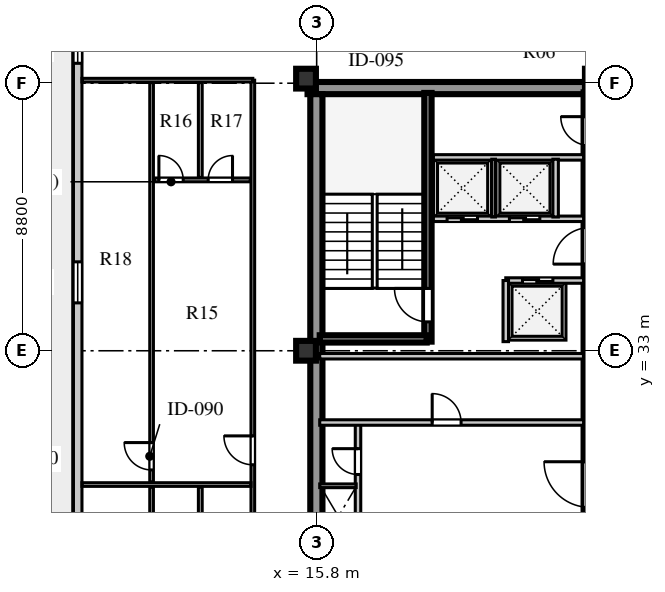
"""IFC4 building model, lengths in metres.
Left out: names, types, materials, properties, quantities, classifications, styles, units other than length and angle.
Written with IfcOpenShell. Run it as: python <this file> out.ifc"""

import sys

from ifc_helpers import new_model, si_unit, direction, frame, frame_2d, origin, origin_2d, place, context, subcontext, project, spatial, rectangle, extrude, element, fill, save


model = new_model("IFC4")
c1 = context("Model", 3, precision=1e-05, world=origin(), true_north=direction((0.0, 1.0)))
c2 = subcontext(c1, "Body", "Model", "MODEL_VIEW")
j1 = project(units=[si_unit("LENGTHUNIT", "METRE"), si_unit("PLANEANGLEUNIT", "RADIAN")], contexts=[c1])
p1 = place(None, origin())
s1 = spatial("IfcSite", under=j1, at=p1, CompositionType="ELEMENT")
p2 = place(p1, origin())
s2 = spatial("IfcBuilding", under=s1, at=p2, CompositionType="ELEMENT")
p3 = place(p2, frame((0.0, 0.0, 221.9)))
s3 = spatial("IfcBuildingStorey", under=s2, at=p3, CompositionType="ELEMENT", Elevation=221.9)
p4 = place(p3, frame((15.5, 41.64, 0.0), z_axis=(0.0, 0.0, 1.0), x_axis=(1.0, 0.0, 0.0)))
e1 = element("IfcWall", 1, at=p4, inside=s3, PredefinedType="SHEAR", context=c2, shape_type="SweptSolid", body=[
    extrude(rectangle(XDim=9.48, YDim=0.4, at=frame_2d((4.74, 0.0))), origin(), (0.0, 0.0, 1.0), 3.66),
])
p5 = place(p3, frame((15.79, 15.81, 0.0), z_axis=(0.0, 0.0, 1.0), x_axis=(0.0, 1.0, 0.0)))
e2 = element("IfcWall", 2, at=p5, inside=s3, PredefinedType="SHEAR", context=c2, shape_type="SweptSolid", body=[
    extrude(rectangle(XDim=25.63, YDim=0.4, at=frame_2d((12.815, 0.0))), origin(), (0.0, 0.0, 1.0), 3.66),
])
p6 = place(p3, frame((24.78, 15.74, 0.0), z_axis=(0.0, 0.0, 1.0), x_axis=(0.0, 1.0, 0.0)))
e3 = element("IfcWall", 3, at=p6, inside=s3, PredefinedType="SHEAR", context=c2, shape_type="SweptSolid", body=[
    extrude(rectangle(XDim=25.76, YDim=0.4, at=frame_2d((12.88, 0.0))), origin(), (0.0, 0.0, 1.0), 3.66),
])
p7 = place(p6, frame((1.61, 0.0, 0.0)))
e4 = element("IfcOpeningElement", 4, at=p7, cuts=e3, PredefinedType="OPENING", context=c2, shape_type="SweptSolid", body=[
    extrude(rectangle(XDim=1.2, YDim=2.1, at=frame_2d((0.6, 1.05))), frame((0.0, 0.21, 0.0), z_axis=(0.0, -1.0, 0.0), x_axis=(1.0, 0.0, 0.0)), (0.0, 0.0, 1.0), 0.42),
])
p8 = place(p6, frame((6.78, 0.0, 0.0)))
e5 = element("IfcOpeningElement", 5, at=p8, cuts=e3, PredefinedType="OPENING", context=c2, shape_type="SweptSolid", body=[
    extrude(rectangle(XDim=0.85, YDim=2.06, at=frame_2d((0.425, 1.03))), frame((0.0, 0.21, 0.0), z_axis=(0.0, -1.0, 0.0), x_axis=(1.0, 0.0, 0.0)), (0.0, 0.0, 1.0), 0.42),
])
p9 = place(p6, frame((12.11, 0.0, 0.0)))
e6 = element("IfcOpeningElement", 6, at=p9, cuts=e3, PredefinedType="OPENING", context=c2, shape_type="SweptSolid", body=[
    extrude(rectangle(XDim=1.5, YDim=2.12, at=frame_2d((0.75, 1.06))), frame((0.0, 0.21, 0.0), z_axis=(0.0, -1.0, 0.0), x_axis=(1.0, 0.0, 0.0)), (0.0, 0.0, 1.0), 0.42),
])
p10 = place(p6, frame((20.11, 0.0, 0.0)))
e7 = element("IfcOpeningElement", 7, at=p10, cuts=e3, PredefinedType="OPENING", context=c2, shape_type="SweptSolid", body=[
    extrude(rectangle(XDim=1.2, YDim=2.12, at=frame_2d((0.6, 1.06))), frame((0.0, 0.21, 0.0), z_axis=(0.0, -1.0, 0.0), x_axis=(1.0, 0.0, 0.0)), (0.0, 0.0, 1.0), 0.42),
])
p11 = place(p6, frame((24.01, 0.0, 0.0)))
e8 = element("IfcOpeningElement", 8, at=p11, cuts=e3, PredefinedType="OPENING", context=c2, shape_type="SweptSolid", body=[
    extrude(rectangle(XDim=0.95, YDim=2.1, at=frame_2d((0.475, 1.05))), frame((0.0, 0.21, 0.0), z_axis=(0.0, -1.0, 0.0), x_axis=(1.0, 0.0, 0.0)), (0.0, 0.0, 1.0), 0.42),
])
for number, where, z_axis, x_axis in (
    (9, (15.45, 33.0, 0.0), (0.0, 0.0, 1.0), (1.0, 0.0, 0.0)),
    (10, (15.45, 41.95, 0.0), (0.0, 0.0, 1.0), (1.0, 0.0, 0.0)),
):
    element("IfcColumn", number, at=place(p3, frame(where, z_axis=z_axis, x_axis=x_axis)), inside=s3, PredefinedType="COLUMN", context=c2, shape_type="SweptSolid", body=[
        extrude(rectangle(XDim=0.65, YDim=0.65, at=origin_2d()), origin(), (0.0, 0.0, 1.0), 3.66),
    ])
p12 = place(p3, frame((7.94, 44.07, 0.0), z_axis=(0.0, 0.0, 1.0), x_axis=(0.0, -1.0, 0.0)))
e11 = element("IfcWall", 11, at=p12, inside=s3, PredefinedType="STANDARD", context=c2, shape_type="SweptSolid", body=[
    extrude(rectangle(XDim=30.94, YDim=0.28, at=frame_2d((15.47, 0.0))), origin(), (0.0, 0.0, 1.0), 3.66),
])
p13 = place(p12, frame((29.325, 0.0, 0.8)))
e12 = element("IfcOpeningElement", 12, at=p13, cuts=e11, PredefinedType="OPENING", context=c2, shape_type="SweptSolid", body=[
    extrude(rectangle(XDim=0.95, YDim=1.65, at=frame_2d((0.475, 0.825))), frame((0.0, 0.15, 0.0), z_axis=(0.0, -1.0, 0.0), x_axis=(1.0, 0.0, 0.0)), (0.0, 0.0, 1.0), 0.3),
])
p14 = place(p12, frame((27.28, 0.0, 0.0)))
e13 = element("IfcOpeningElement", 13, at=p14, cuts=e11, PredefinedType="OPENING", context=c2, shape_type="SweptSolid", body=[
    extrude(rectangle(XDim=1.0, YDim=2.05, at=frame_2d((0.5, 1.025))), frame((0.0, 0.15, 0.0), z_axis=(0.0, -1.0, 0.0), x_axis=(1.0, 0.0, 0.0)), (0.0, 0.0, 1.0), 0.3),
])
p15 = place(p12, frame((23.47, 0.0, 0.8)))
e14 = element("IfcOpeningElement", 14, at=p15, cuts=e11, PredefinedType="OPENING", context=c2, shape_type="SweptSolid", body=[
    extrude(rectangle(XDim=2.4, YDim=2.05, at=frame_2d((1.2, 1.025))), frame((0.0, 0.15, 0.0), z_axis=(0.0, -1.0, 0.0), x_axis=(1.0, 0.0, 0.0)), (0.0, 0.0, 1.0), 0.3),
])
p16 = place(p12, frame((17.745, 0.0, 0.8)))
e15 = element("IfcOpeningElement", 15, at=p16, cuts=e11, PredefinedType="OPENING", context=c2, shape_type="SweptSolid", body=[
    extrude(rectangle(XDim=2.1, YDim=1.95, at=frame_2d((1.05, 0.975))), frame((0.0, 0.15, 0.0), z_axis=(0.0, -1.0, 0.0), x_axis=(1.0, 0.0, 0.0)), (0.0, 0.0, 1.0), 0.3),
])
p17 = place(p12, frame((8.145, 0.0, 0.8)))
e16 = element("IfcOpeningElement", 16, at=p17, cuts=e11, PredefinedType="OPENING", context=c2, shape_type="SweptSolid", body=[
    extrude(rectangle(XDim=1.35, YDim=1.9, at=frame_2d((0.675, 0.95))), frame((0.0, 0.15, 0.0), z_axis=(0.0, -1.0, 0.0), x_axis=(1.0, 0.0, 0.0)), (0.0, 0.0, 1.0), 0.3),
])
p18 = place(p12, frame((0.665, 0.0, 0.8)))
e17 = element("IfcOpeningElement", 17, at=p18, cuts=e11, PredefinedType="OPENING", context=c2, shape_type="SweptSolid", body=[
    extrude(rectangle(XDim=0.95, YDim=1.65, at=frame_2d((0.475, 0.825))), frame((0.0, 0.15, 0.0), z_axis=(0.0, -1.0, 0.0), x_axis=(1.0, 0.0, 0.0)), (0.0, 0.0, 1.0), 0.3),
])
p19 = place(p3, frame((17.16, 26.58, 0.0), z_axis=(0.0, 0.0, 1.0), x_axis=(0.0, 1.0, 0.0)))
e18 = element("IfcWall", 18, at=p19, inside=s3, PredefinedType="SOLIDWALL", context=c2, shape_type="SweptSolid", body=[
    extrude(rectangle(XDim=4.02, YDim=0.18, at=frame_2d((2.01, 0.0))), origin(), (0.0, 0.0, 1.0), 3.66),
])
p20 = place(p19, frame((2.35, 0.0, 0.0)))
e19 = element("IfcOpeningElement", 19, at=p20, cuts=e18, PredefinedType="OPENING", context=c2, shape_type="SweptSolid", body=[
    extrude(rectangle(XDim=0.85, YDim=2.06, at=frame_2d((0.425, 1.03))), frame((0.0, 0.1, 0.0), z_axis=(0.0, -1.0, 0.0), x_axis=(1.0, 0.0, 0.0)), (0.0, 0.0, 1.0), 0.2),
])
p21 = place(p3, frame((15.9, 28.56, 0.0), z_axis=(0.0, 0.0, 1.0), x_axis=(1.0, 0.0, 0.0)))
e20 = element("IfcWall", 20, at=p21, inside=s3, PredefinedType="PARTITIONING", context=c2, shape_type="SweptSolid", body=[
    extrude(rectangle(XDim=1.2, YDim=0.12, at=frame_2d((0.6, 0.0))), origin(), (0.0, 0.0, 1.0), 3.66),
])
p22 = place(p3, frame((15.9, 30.64, 0.0), z_axis=(0.0, 0.0, 1.0), x_axis=(1.0, 0.0, 0.0)))
e21 = element("IfcWall", 21, at=p22, inside=s3, PredefinedType="SOLIDWALL", context=c2, shape_type="SweptSolid", body=[
    extrude(rectangle(XDim=8.68, YDim=0.18, at=frame_2d((4.34, 0.0))), origin(), (0.0, 0.0, 1.0), 3.66),
])
p23 = place(p22, frame((3.7, 0.0, 0.0)))
e22 = element("IfcOpeningElement", 22, at=p23, cuts=e21, PredefinedType="OPENING", context=c2, shape_type="SweptSolid", body=[
    extrude(rectangle(XDim=0.95, YDim=2.1, at=frame_2d((0.475, 1.05))), frame((0.0, 0.1, 0.0), z_axis=(0.0, -1.0, 0.0), x_axis=(1.0, 0.0, 0.0)), (0.0, 0.0, 1.0), 0.2),
])
p24 = place(p3, frame((15.9, 32.82, 0.0), z_axis=(0.0, 0.0, 1.0), x_axis=(1.0, 0.0, 0.0)))
e23 = element("IfcWall", 23, at=p24, inside=s3, PredefinedType="SOLIDWALL", context=c2, shape_type="SweptSolid", body=[
    extrude(rectangle(XDim=8.68, YDim=0.18, at=frame_2d((4.34, 0.0))), origin(), (0.0, 0.0, 1.0), 3.06),
])
p25 = place(p3, frame((19.46, 33.3, 0.0), z_axis=(0.0, 0.0, 1.0), x_axis=(0.0, 1.0, 0.0)))
e24 = element("IfcWall", 24, at=p25, inside=s3, PredefinedType="SHEAR", context=c2, shape_type="SweptSolid", body=[
    extrude(rectangle(XDim=8.18, YDim=0.24, at=frame_2d((4.09, 0.0))), origin(), (0.0, 0.0, 1.0), 3.9),
])
p26 = place(p25, frame((0.65, 0.0, 0.0)))
e25 = element("IfcOpeningElement", 25, at=p26, cuts=e24, PredefinedType="OPENING", context=c2, shape_type="SweptSolid", body=[
    extrude(rectangle(XDim=1.1, YDim=2.1, at=frame_2d((0.55, 1.05))), frame((0.0, 0.13, 0.0), z_axis=(0.0, -1.0, 0.0), x_axis=(1.0, 0.0, 0.0)), (0.0, 0.0, 1.0), 0.26),
])
p27 = place(p3, frame((15.9, 33.39, 0.0), z_axis=(0.0, 0.0, 1.0), x_axis=(1.0, 0.0, 0.0)))
e26 = element("IfcWall", 26, at=p27, inside=s3, PredefinedType="SHEAR", context=c2, shape_type="SweptSolid", body=[
    extrude(rectangle(XDim=3.52, YDim=0.24, at=frame_2d((1.76, 0.0))), origin(), (0.0, 0.0, 1.0), 3.9),
])
p28 = place(p3, frame((22.02, 35.31, 0.0), z_axis=(0.0, 0.0, 1.0), x_axis=(1.0, 0.0, 0.0)))
e27 = element("IfcWall", 27, at=p28, inside=s3, PredefinedType="SOLIDWALL", context=c2, shape_type="SweptSolid", body=[
    extrude(rectangle(XDim=2.56, YDim=0.18, at=frame_2d((1.28, 0.0))), origin(), (0.0, 0.0, 1.0), 3.66),
])
p29 = place(p28, frame((0.55, 0.0, 0.0)))
e28 = element("IfcOpeningElement", 28, at=p29, cuts=e27, PredefinedType="OPENING", context=c2, shape_type="SweptSolid", body=[
    extrude(rectangle(XDim=1.0, YDim=2.1, at=frame_2d((0.5, 1.05))), frame((0.0, 0.1, 0.0), z_axis=(0.0, -1.0, 0.0), x_axis=(1.0, 0.0, 0.0)), (0.0, 0.0, 1.0), 0.2),
])
p30 = place(p3, frame((22.02, 33.3, 0.0), z_axis=(0.0, 0.0, 1.0), x_axis=(0.0, 1.0, 0.0)))
e29 = element("IfcWall", 29, at=p30, inside=s3, PredefinedType="SOLIDWALL", context=c2, shape_type="SweptSolid", body=[
    extrude(rectangle(XDim=2.01, YDim=0.18, at=frame_2d((1.005, 0.0))), origin(), (0.0, 0.0, 1.0), 3.66),
])
p31 = place(p3, frame((19.64, 37.34, 0.0), z_axis=(0.0, 0.0, 1.0), x_axis=(1.0, 0.0, 0.0)))
e30 = element("IfcWall", 30, at=p31, inside=s3, PredefinedType="SOLIDWALL", context=c2, shape_type="SweptSolid", body=[
    extrude(rectangle(XDim=4.94, YDim=0.18, at=frame_2d((2.47, 0.0))), origin(), (0.0, 0.0, 1.0), 3.66),
])
p32 = place(p31, frame((0.45, 0.0, 0.0)))
e31 = element("IfcOpeningElement", 31, at=p32, cuts=e30, PredefinedType="OPENING", context=c2, shape_type="SweptSolid", body=[
    extrude(rectangle(XDim=1.0, YDim=2.1, at=frame_2d((0.5, 1.05))), frame((0.0, 0.1, 0.0), z_axis=(0.0, -1.0, 0.0), x_axis=(1.0, 0.0, 0.0)), (0.0, 0.0, 1.0), 0.2),
])
p33 = place(p31, frame((2.5, 0.0, 0.0)))
e32 = element("IfcOpeningElement", 32, at=p33, cuts=e30, PredefinedType="OPENING", context=c2, shape_type="SweptSolid", body=[
    extrude(rectangle(XDim=1.0, YDim=2.1, at=frame_2d((0.5, 1.05))), frame((0.0, 0.1, 0.0), z_axis=(0.0, -1.0, 0.0), x_axis=(1.0, 0.0, 0.0)), (0.0, 0.0, 1.0), 0.2),
])
p34 = place(p3, frame((19.64, 39.36, 0.0), z_axis=(0.0, 0.0, 1.0), x_axis=(1.0, 0.0, 0.0)))
e33 = element("IfcWall", 33, at=p34, inside=s3, PredefinedType="SOLIDWALL", context=c2, shape_type="SweptSolid", body=[
    extrude(rectangle(XDim=4.94, YDim=0.18, at=frame_2d((2.47, 0.0))), origin(), (0.0, 0.0, 1.0), 3.66),
])
p35 = place(p3, frame((21.62, 37.4, 0.0), z_axis=(0.0, 0.0, 1.0), x_axis=(0.0, 1.0, 0.0)))
e34 = element("IfcWall", 34, at=p35, inside=s3, PredefinedType="PARTITIONING", context=c2, shape_type="SweptSolid", body=[
    extrude(rectangle(XDim=1.9, YDim=0.12, at=frame_2d((0.95, 0.0))), origin(), (0.0, 0.0, 1.0), 3.66),
])
p36 = place(p3, frame((23.66, 37.4, 0.0), z_axis=(0.0, 0.0, 1.0), x_axis=(0.0, 1.0, 0.0)))
e35 = element("IfcWall", 35, at=p36, inside=s3, PredefinedType="SOLIDWALL", context=c2, shape_type="SweptSolid", body=[
    extrude(rectangle(XDim=1.9, YDim=0.18, at=frame_2d((0.95, 0.0))), origin(), (0.0, 0.0, 1.0), 3.66),
])
p37 = place(p3, frame((13.7, 15.3, 0.0), z_axis=(0.0, 0.0, 1.0), x_axis=(0.0, 1.0, 0.0)))
e36 = element("IfcWall", 36, at=p37, inside=s3, PredefinedType="PARTITIONING", context=c2, shape_type="SweptSolid", body=[
    extrude(rectangle(XDim=26.6, YDim=0.12, at=frame_2d((13.3, 0.0))), origin(), (0.0, 0.0, 1.0), 3.66),
])
p38 = place(p37, frame((0.65, 0.0, 0.0)))
e37 = element("IfcOpeningElement", 37, at=p38, cuts=e36, PredefinedType="OPENING", context=c2, shape_type="SweptSolid", body=[
    extrude(rectangle(XDim=0.95, YDim=2.1, at=frame_2d((0.475, 1.05))), frame((0.0, 0.07, 0.0), z_axis=(0.0, -1.0, 0.0), x_axis=(1.0, 0.0, 0.0)), (0.0, 0.0, 1.0), 0.14),
])
p39 = place(p37, frame((13.95, 0.0, 0.0)))
e38 = element("IfcOpeningElement", 38, at=p39, cuts=e36, PredefinedType="OPENING", context=c2, shape_type="SweptSolid", body=[
    extrude(rectangle(XDim=0.95, YDim=2.1, at=frame_2d((0.475, 1.05))), frame((0.0, 0.07, 0.0), z_axis=(0.0, -1.0, 0.0), x_axis=(1.0, 0.0, 0.0)), (0.0, 0.0, 1.0), 0.14),
])
p40 = place(p3, frame((8.08, 41.9, 0.0), z_axis=(0.0, 0.0, 1.0), x_axis=(1.0, 0.0, 0.0)))
e39 = element("IfcWall", 39, at=p40, inside=s3, PredefinedType="PARTITIONING", context=c2, shape_type="SweptSolid", body=[
    extrude(rectangle(XDim=5.62, YDim=0.12, at=frame_2d((2.81, 0.0))), origin(), (0.0, 0.0, 1.0), 3.21),
])
p41 = place(p3, frame((10.37, 15.38, 0.0), z_axis=(0.0, 0.0, 1.0), x_axis=(0.0, 1.0, 0.0)))
e40 = element("IfcWall", 40, at=p41, inside=s3, PredefinedType="PARTITIONING", context=c2, shape_type="SweptSolid", body=[
    extrude(rectangle(XDim=13.14, YDim=0.12, at=frame_2d((6.57, 0.0))), origin(), (0.0, 0.0, 1.0), 3.66),
])
p42 = place(p41, frame((5.52, 0.0, 0.0)))
e41 = element("IfcOpeningElement", 41, at=p42, cuts=e40, PredefinedType="OPENING", context=c2, shape_type="SweptSolid", body=[
    extrude(rectangle(XDim=0.85, YDim=2.08, at=frame_2d((0.425, 1.04))), frame((0.0, 0.07, 0.0), z_axis=(0.0, -1.0, 0.0), x_axis=(1.0, 0.0, 0.0)), (0.0, 0.0, 1.0), 0.14),
])
p43 = place(p41, frame((6.82, 0.0, 0.0)))
e42 = element("IfcOpeningElement", 42, at=p43, cuts=e40, PredefinedType="OPENING", context=c2, shape_type="SweptSolid", body=[
    extrude(rectangle(XDim=0.85, YDim=2.08, at=frame_2d((0.425, 1.04))), frame((0.0, 0.07, 0.0), z_axis=(0.0, -1.0, 0.0), x_axis=(1.0, 0.0, 0.0)), (0.0, 0.0, 1.0), 0.14),
])
p44 = place(p3, frame((11.972, 25.4, 0.0), z_axis=(0.0, 0.0, 1.0), x_axis=(0.0, 1.0, 0.0)))
e43 = element("IfcWall", 43, at=p44, inside=s3, PredefinedType="PLUMBINGWALL", context=c2, shape_type="SweptSolid", body=[
    extrude(rectangle(XDim=3.12, YDim=0.125, at=frame_2d((1.56, 0.0))), origin(), (0.0, 0.0, 1.0), 3.66),
])
p45 = place(p3, frame((8.08, 28.6, 0.0), z_axis=(0.0, 0.0, 1.0), x_axis=(1.0, 0.0, 0.0)))
e44 = element("IfcWall", 44, at=p45, inside=s3, PredefinedType="PARTITIONING", context=c2, shape_type="SweptSolid", body=[
    extrude(rectangle(XDim=5.56, YDim=0.12, at=frame_2d((2.78, 0.0))), origin(), (0.0, 0.0, 1.0), 3.66),
])
p46 = place(p3, frame((10.37, 28.68, 0.0), z_axis=(0.0, 0.0, 1.0), x_axis=(0.0, 1.0, 0.0)))
e45 = element("IfcWall", 45, at=p46, inside=s3, PredefinedType="PARTITIONING", context=c2, shape_type="SweptSolid", body=[
    extrude(rectangle(XDim=13.14, YDim=0.12, at=frame_2d((6.57, 0.0))), origin(), (0.0, 0.0, 1.0), 3.66),
])
p47 = place(p46, frame((0.4, 0.0, 0.0)))
e46 = element("IfcOpeningElement", 46, at=p47, cuts=e45, PredefinedType="OPENING", context=c2, shape_type="SweptSolid", body=[
    extrude(rectangle(XDim=0.9, YDim=2.08, at=frame_2d((0.45, 1.04))), frame((0.0, 0.07, 0.0), z_axis=(0.0, -1.0, 0.0), x_axis=(1.0, 0.0, 0.0)), (0.0, 0.0, 1.0), 0.14),
])
p48 = place(p3, frame((10.45, 38.62, 0.0), z_axis=(0.0, 0.0, 1.0), x_axis=(1.0, 0.0, 0.0)))
e47 = element("IfcWall", 47, at=p48, inside=s3, PredefinedType="PLUMBINGWALL", context=c2, shape_type="SweptSolid", body=[
    extrude(rectangle(XDim=3.17, YDim=0.125, at=frame_2d((1.585, 0.0))), origin(), (0.0, 0.0, 1.0), 3.66),
])
p49 = place(p48, frame((0.16, 0.0, 0.0)))
e48 = element("IfcOpeningElement", 48, at=p49, cuts=e47, PredefinedType="OPENING", context=c2, shape_type="SweptSolid", body=[
    extrude(rectangle(XDim=0.8, YDim=2.05, at=frame_2d((0.4, 1.025))), frame((0.0, 0.073, 0.0), z_axis=(0.0, -1.0, 0.0), x_axis=(1.0, 0.0, 0.0)), (0.0, 0.0, 1.0), 0.145),
])
p50 = place(p48, frame((1.782, 0.0, 0.0)))
e49 = element("IfcOpeningElement", 49, at=p50, cuts=e47, PredefinedType="OPENING", context=c2, shape_type="SweptSolid", body=[
    extrude(rectangle(XDim=0.8, YDim=2.05, at=frame_2d((0.4, 1.025))), frame((0.0, 0.073, 0.0), z_axis=(0.0, -1.0, 0.0), x_axis=(1.0, 0.0, 0.0)), (0.0, 0.0, 1.0), 0.145),
])
p51 = place(p3, frame((11.972, 38.7, 0.0), z_axis=(0.0, 0.0, 1.0), x_axis=(0.0, 1.0, 0.0)))
e50 = element("IfcWall", 50, at=p51, inside=s3, PredefinedType="PLUMBINGWALL", context=c2, shape_type="SweptSolid", body=[
    extrude(rectangle(XDim=3.12, YDim=0.125, at=frame_2d((1.56, 0.0))), origin(), (0.0, 0.0, 1.0), 3.66),
])
p52 = place(p17, origin())
e51 = element("IfcWindow", 51, at=p52, inside=s3, PartitioningType="SINGLE_PANEL", PredefinedType="WINDOW", context=c2, shape_type="SweptSolid", body=[
    extrude(rectangle(XDim=1.35, YDim=1.9, at=frame_2d((0.675, 0.95))), frame((0.0, 0.03, 0.0), z_axis=(0.0, -1.0, 0.0), x_axis=(1.0, 0.0, 0.0)), (0.0, 0.0, 1.0), 0.06),
])
fill(e16, e51)
p53 = place(p18, origin())
e52 = element("IfcWindow", 52, at=p53, inside=s3, PartitioningType="SINGLE_PANEL", PredefinedType="WINDOW", context=c2, shape_type="SweptSolid", body=[
    extrude(rectangle(XDim=0.95, YDim=1.65, at=frame_2d((0.475, 0.825))), frame((0.0, 0.03, 0.0), z_axis=(0.0, -1.0, 0.0), x_axis=(1.0, 0.0, 0.0)), (0.0, 0.0, 1.0), 0.06),
])
fill(e17, e52)
p54 = place(p20, origin())
e53 = element("IfcDoor", 53, at=p54, inside=s3, OperationType="SINGLE_SWING_RIGHT", PredefinedType="DOOR", context=c2, shape_type="SweptSolid", body=[
    extrude(rectangle(XDim=0.85, YDim=2.06, at=frame_2d((0.425, 1.03))), frame((0.0, 0.025, 0.0), z_axis=(0.0, -1.0, 0.0), x_axis=(1.0, 0.0, 0.0)), (0.0, 0.0, 1.0), 0.05),
])
fill(e19, e53)
p55 = place(p23, frame((0.95, 0.0, 0.0), z_axis=(0.0, 0.0, 1.0), x_axis=(-1.0, 0.0, 0.0)))
e54 = element("IfcDoor", 54, at=p55, inside=s3, OperationType="SINGLE_SWING_RIGHT", PredefinedType="DOOR", context=c2, shape_type="SweptSolid", body=[
    extrude(rectangle(XDim=0.95, YDim=2.1, at=frame_2d((0.475, 1.05))), frame((0.0, 0.025, 0.0), z_axis=(0.0, -1.0, 0.0), x_axis=(1.0, 0.0, 0.0)), (0.0, 0.0, 1.0), 0.05),
])
fill(e22, e54)
p56 = place(p26, origin())
e55 = element("IfcDoor", 55, at=p56, inside=s3, OperationType="SINGLE_SWING_RIGHT", PredefinedType="DOOR", context=c2, shape_type="SweptSolid", body=[
    extrude(rectangle(XDim=1.1, YDim=2.1, at=frame_2d((0.55, 1.05))), frame((0.0, 0.025, 0.0), z_axis=(0.0, -1.0, 0.0), x_axis=(1.0, 0.0, 0.0)), (0.0, 0.0, 1.0), 0.05),
])
fill(e25, e55)
p57 = place(p32, frame((1.0, 0.0, 0.0), z_axis=(0.0, 0.0, 1.0), x_axis=(-1.0, 0.0, 0.0)))
e56 = element("IfcDoor", 56, at=p57, inside=s3, OperationType="DOUBLE_DOOR_SLIDING", PredefinedType="DOOR", context=c2, shape_type="SweptSolid", body=[
    extrude(rectangle(XDim=1.0, YDim=2.1, at=frame_2d((0.5, 1.05))), frame((0.0, 0.025, 0.0), z_axis=(0.0, -1.0, 0.0), x_axis=(1.0, 0.0, 0.0)), (0.0, 0.0, 1.0), 0.05),
])
fill(e31, e56)
p58 = place(p33, frame((1.0, 0.0, 0.0), z_axis=(0.0, 0.0, 1.0), x_axis=(-1.0, 0.0, 0.0)))
e57 = element("IfcDoor", 57, at=p58, inside=s3, OperationType="DOUBLE_DOOR_SLIDING", PredefinedType="DOOR", context=c2, shape_type="SweptSolid", body=[
    extrude(rectangle(XDim=1.0, YDim=2.1, at=frame_2d((0.5, 1.05))), frame((0.0, 0.025, 0.0), z_axis=(0.0, -1.0, 0.0), x_axis=(1.0, 0.0, 0.0)), (0.0, 0.0, 1.0), 0.05),
])
fill(e32, e57)
p59 = place(p29, origin())
e58 = element("IfcDoor", 58, at=p59, inside=s3, OperationType="DOUBLE_DOOR_SLIDING", PredefinedType="DOOR", context=c2, shape_type="SweptSolid", body=[
    extrude(rectangle(XDim=1.0, YDim=2.1, at=frame_2d((0.5, 1.05))), frame((0.0, 0.025, 0.0), z_axis=(0.0, -1.0, 0.0), x_axis=(1.0, 0.0, 0.0)), (0.0, 0.0, 1.0), 0.05),
])
fill(e28, e58)
p60 = place(p49, origin())
e59 = element("IfcDoor", 59, at=p60, inside=s3, OperationType="SINGLE_SWING_LEFT", PredefinedType="DOOR", context=c2, shape_type="SweptSolid", body=[
    extrude(rectangle(XDim=0.8, YDim=2.05, at=frame_2d((0.4, 1.025))), frame((0.0, 0.025, 0.0), z_axis=(0.0, -1.0, 0.0), x_axis=(1.0, 0.0, 0.0)), (0.0, 0.0, 1.0), 0.05),
])
fill(e48, e59)
p61 = place(p50, origin())
e60 = element("IfcDoor", 60, at=p61, inside=s3, OperationType="SINGLE_SWING_RIGHT", PredefinedType="DOOR", context=c2, shape_type="SweptSolid", body=[
    extrude(rectangle(XDim=0.8, YDim=2.05, at=frame_2d((0.4, 1.025))), frame((0.0, 0.025, 0.0), z_axis=(0.0, -1.0, 0.0), x_axis=(1.0, 0.0, 0.0)), (0.0, 0.0, 1.0), 0.05),
])
fill(e49, e60)
p62 = place(p47, frame((0.9, 0.0, 0.0), z_axis=(0.0, 0.0, 1.0), x_axis=(-1.0, 0.0, 0.0)))
e61 = element("IfcDoor", 61, at=p62, inside=s3, OperationType="SINGLE_SWING_LEFT", PredefinedType="DOOR", context=c2, shape_type="SweptSolid", body=[
    extrude(rectangle(XDim=0.9, YDim=2.08, at=frame_2d((0.45, 1.04))), frame((0.0, 0.025, 0.0), z_axis=(0.0, -1.0, 0.0), x_axis=(1.0, 0.0, 0.0)), (0.0, 0.0, 1.0), 0.05),
])
fill(e46, e61)
p63 = place(p39, frame((0.95, 0.0, 0.0), z_axis=(0.0, 0.0, 1.0), x_axis=(-1.0, 0.0, 0.0)))
e62 = element("IfcDoor", 62, at=p63, inside=s3, OperationType="SINGLE_SWING_LEFT", PredefinedType="DOOR", context=c2, shape_type="SweptSolid", body=[
    extrude(rectangle(XDim=0.95, YDim=2.1, at=frame_2d((0.475, 1.05))), frame((0.0, 0.025, 0.0), z_axis=(0.0, -1.0, 0.0), x_axis=(1.0, 0.0, 0.0)), (0.0, 0.0, 1.0), 0.05),
])
fill(e38, e62)
save(model, sys.argv[1])
